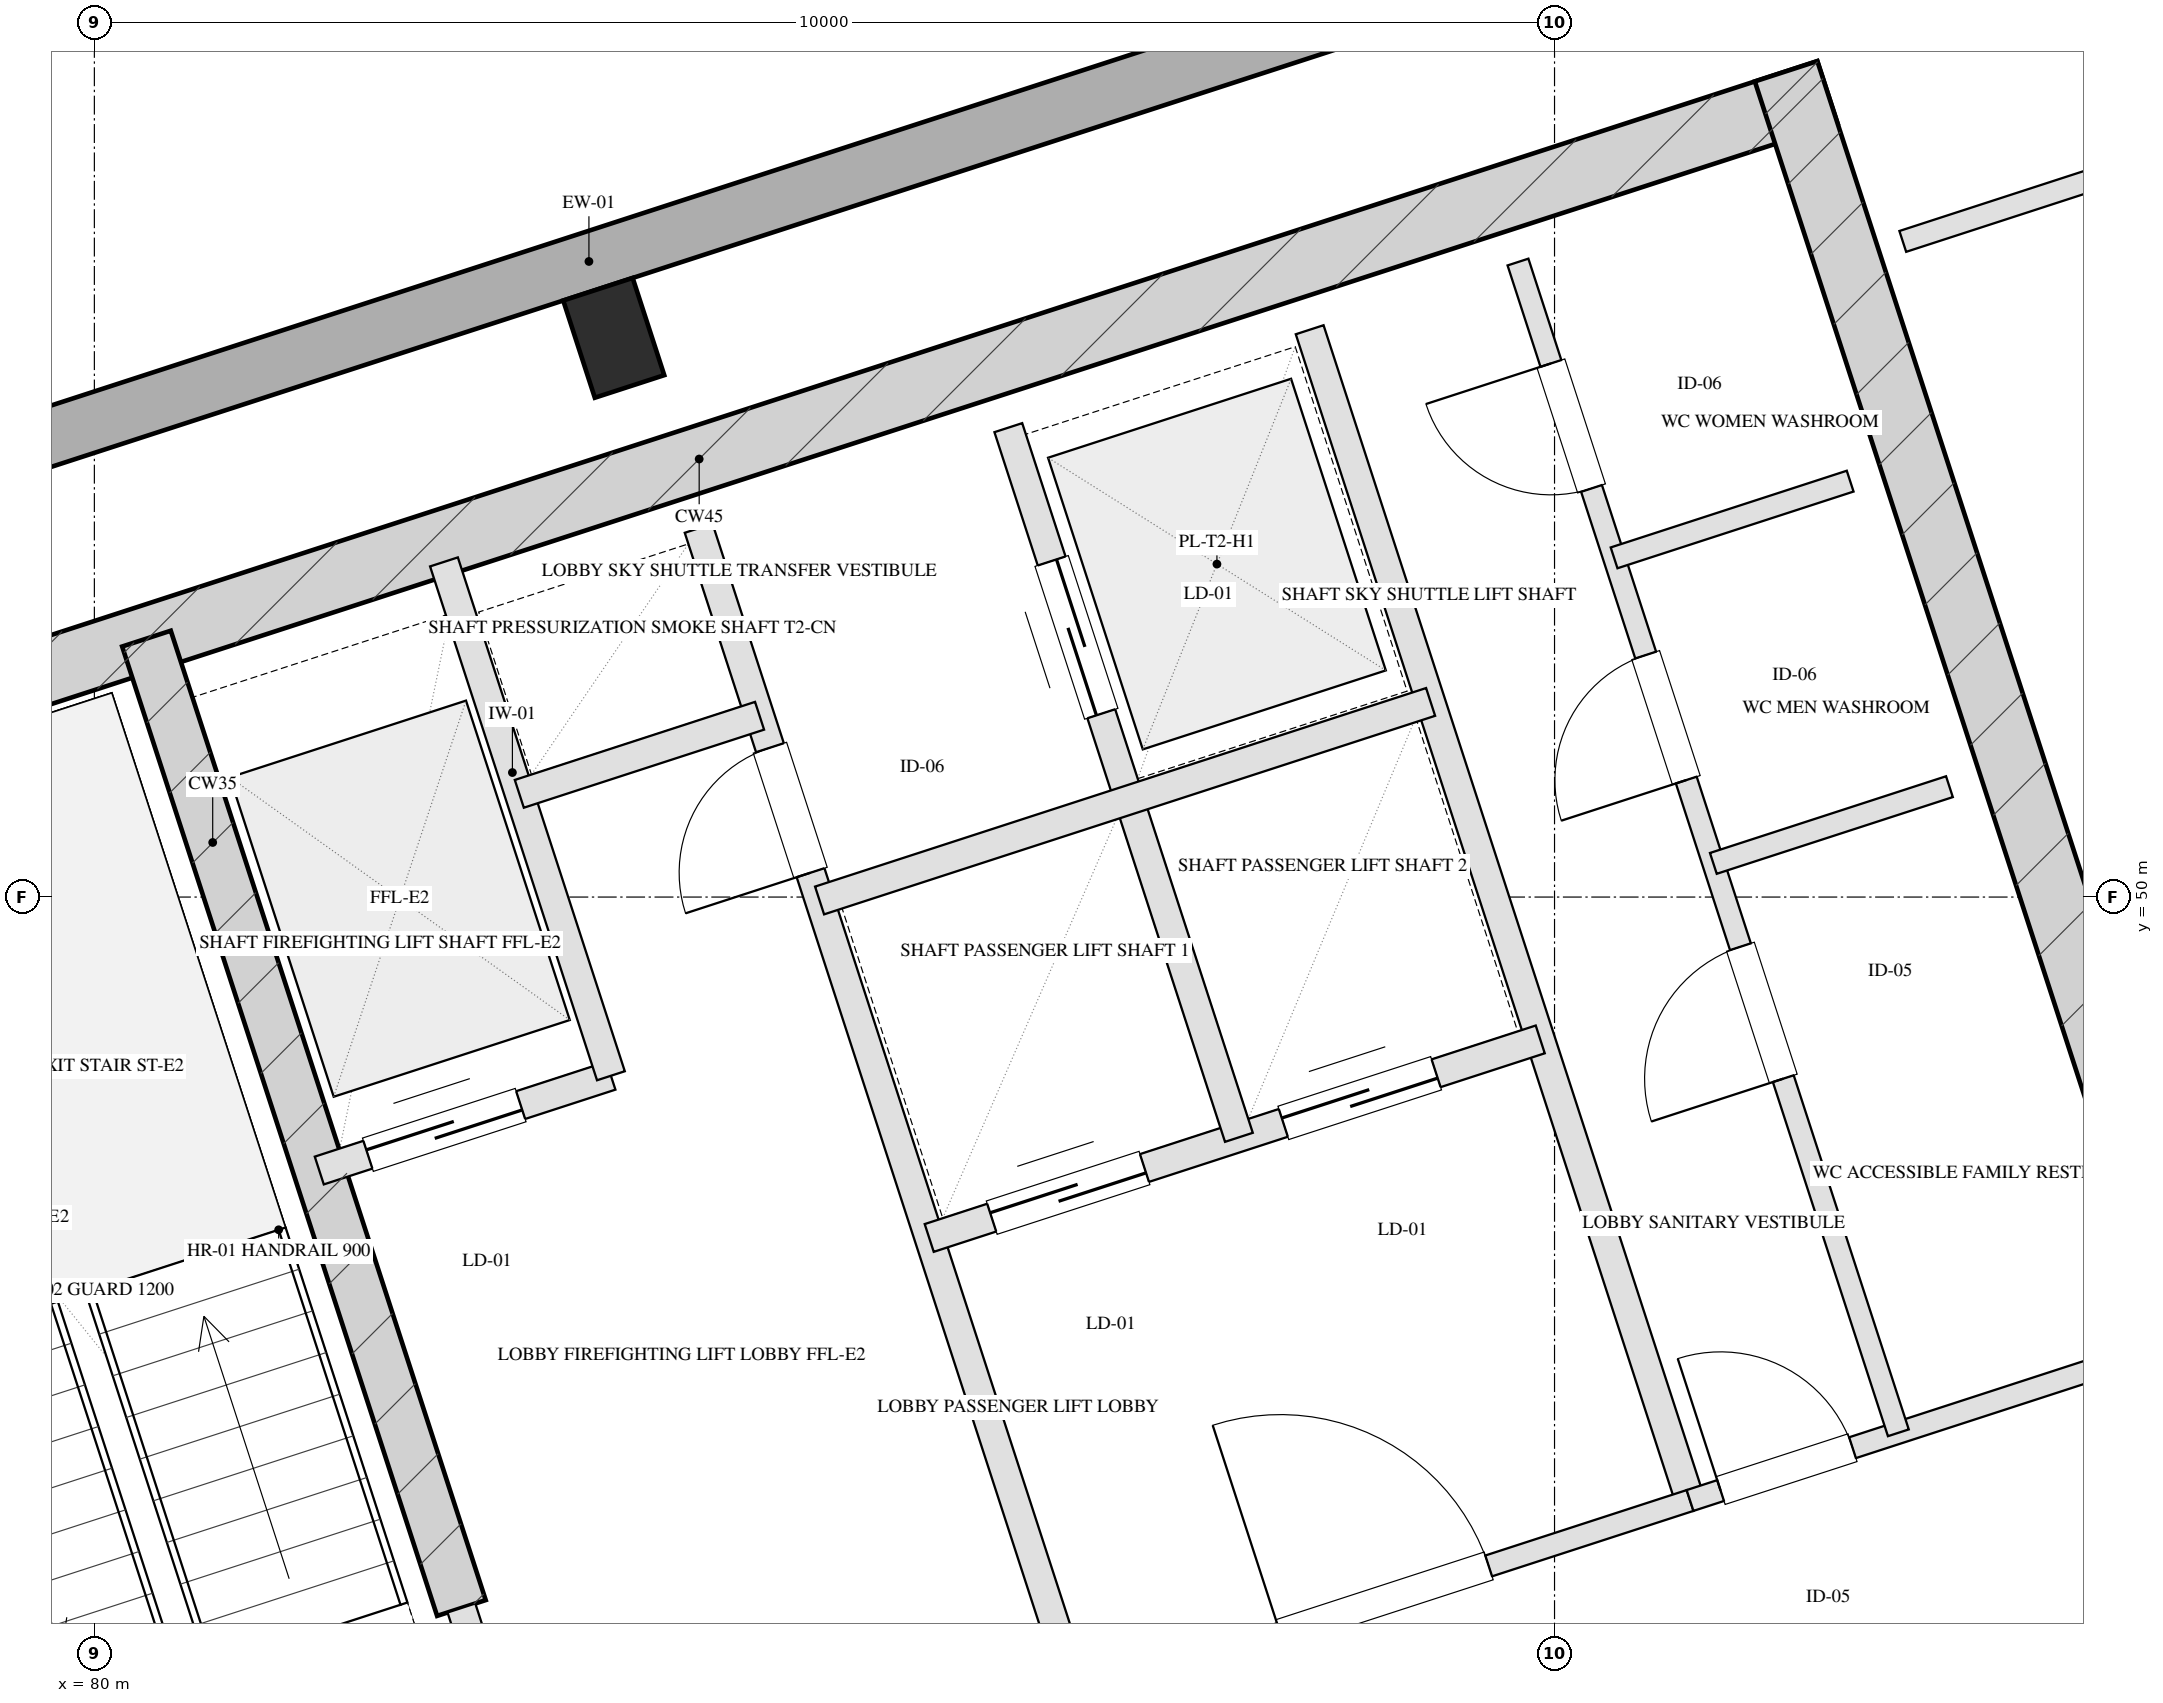
"""IFC4 building model, lengths in metres.
Left out: names, types, materials, properties, quantities, classifications, styles, units other than length and angle.
Written with IfcOpenShell. Run it as: python <this file> out.ifc"""

import sys

from ifc_helpers import new_model, si_unit, direction, frame, frame_2d, origin, origin_2d, place, context, subcontext, project, spatial, rectangle, hollow_rectangle, extrude, element, fill, save


model = new_model("IFC4")
c1 = context("Model", 3, precision=1e-05, world=origin(), true_north=direction((0.0, 1.0)))
c2 = subcontext(c1, "Body", "Model", "MODEL_VIEW")
j1 = project(units=[si_unit("LENGTHUNIT", "METRE"), si_unit("PLANEANGLEUNIT", "RADIAN")], contexts=[c1])
p1 = place(None, origin())
s1 = spatial("IfcSite", under=j1, at=p1, CompositionType="ELEMENT")
p2 = place(p1, origin())
s2 = spatial("IfcBuilding", under=s1, at=p2, CompositionType="ELEMENT")
p3 = place(p2, frame((0.0, 0.0, 216.2)))
s3 = spatial("IfcBuildingStorey", under=s2, at=p3, CompositionType="ELEMENT", Elevation=216.2)
p4 = place(p3, frame((76.415, 50.489, 0.0), z_axis=(0.0, 0.0, 1.0), x_axis=(0.951056810414, 0.309016089169, 0.0)))
e1 = element("IfcWall", 1, at=p4, inside=s3, PredefinedType="SHEAR", context=c2, shape_type="SweptSolid", body=[
    extrude(rectangle(XDim=16.25, YDim=0.45, at=frame_2d((8.125, 0.0))), origin(), (0.0, 0.0, 1.0), 3.45),
])
p5 = place(p3, frame((94.469, 46.781, 0.0), z_axis=(0.0, 0.0, 1.0), x_axis=(-0.309004419953, 0.951060601881, 0.0)))
e2 = element("IfcWall", 2, at=p5, inside=s3, PredefinedType="SHEAR", context=c2, shape_type="SweptSolid", body=[
    extrude(rectangle(XDim=9.33, YDim=0.45, at=frame_2d((4.665, 0.0))), origin(), (0.0, 0.0, 1.0), 3.45),
])
p6 = place(p3, frame((82.514, 45.131, 0.0), z_axis=(0.0, 0.0, 1.0), x_axis=(-0.308988790936, 0.951065679686, 0.0)))
e3 = element("IfcWall", 3, at=p6, inside=s3, PredefinedType="SHEAR", context=c2, shape_type="SweptSolid", body=[
    extrude(rectangle(XDim=6.98, YDim=0.35, at=frame_2d((3.49, 0.0))), origin(), (0.0, 0.0, 1.0), 3.45),
])
p7 = place(p3, frame((83.557, 53.83, 0.0), z_axis=(0.0, 0.0, 1.0), x_axis=(0.951056516295, 0.309016994375, 0.0)))
e4 = element("IfcColumn", 4, at=p7, inside=s3, PredefinedType="COLUMN", context=c2, shape_type="SweptSolid", body=[
    extrude(hollow_rectangle(XDim=0.5, YDim=0.7, WallThickness=0.025, at=origin_2d()), origin(), (0.0, 0.0, 1.0), 3.451),
])
p8 = place(p3, frame((82.618, 11.414, 0.0), z_axis=(0.0, 0.0, 1.0), x_axis=(-0.309016491071, 0.951056679828, 0.0)))
e5 = element("IfcWall", 5, at=p8, inside=s3, PredefinedType="SOLIDWALL", context=c2, shape_type="SweptSolid", body=[
    extrude(rectangle(XDim=38.4, YDim=0.4, at=frame_2d((19.2, 0.0))), origin(), (0.0, 0.0, 1.0), 2.55),
])
p9 = place(p8, frame((24.15, 0.0, 0.0)))
e6 = element("IfcOpeningElement", 6, at=p9, cuts=e5, PredefinedType="OPENING", context=c2, shape_type="SweptSolid", body=[
    extrude(rectangle(XDim=1.8, YDim=2.2, at=frame_2d((0.9, 1.1))), frame((0.0, 0.21, 0.0), z_axis=(0.0, -1.0, 0.0), x_axis=(1.0, 0.0, 0.0)), (0.0, 0.0, 1.0), 0.42),
])
p10 = place(p3, frame((72.165, 50.706, 0.0), z_axis=(0.0, 0.0, 1.0), x_axis=(0.951058012937, 0.309012388148, 0.0)))
e7 = element("IfcWall", 7, at=p10, inside=s3, PredefinedType="SOLIDWALL", context=c2, shape_type="SweptSolid", body=[
    extrude(rectangle(XDim=23.6, YDim=0.4, at=frame_2d((11.8, 0.0))), origin(), (0.0, 0.0, 1.0), 2.55),
])
p11 = place(p3, frame((83.101, 43.324, 0.0), z_axis=(0.0, 0.0, 1.0), x_axis=(-0.309048298632, 0.951046344356, 0.0)))
e8 = element("IfcWall", 8, at=p11, inside=s3, PredefinedType="PARTITIONING", context=c2, shape_type="SweptSolid", body=[
    extrude(rectangle(XDim=1.9, YDim=0.2, at=frame_2d((0.95, 0.0))), origin(), (0.0, 0.0, 1.0), 3.155),
])
p12 = place(p11, frame((0.52, 0.0, 0.0)))
e9 = element("IfcOpeningElement", 9, at=p12, cuts=e8, PredefinedType="OPENING", context=c2, shape_type="SweptSolid", body=[
    extrude(rectangle(XDim=1.1, YDim=2.05, at=frame_2d((0.55, 1.025))), frame((0.0, 0.11, 0.0), z_axis=(0.0, -1.0, 0.0), x_axis=(1.0, 0.0, 0.0)), (0.0, 0.0, 1.0), 0.22),
])
p13 = place(p3, frame((86.743, 44.508, 0.0), z_axis=(0.0, 0.0, 1.0), x_axis=(-0.309016001439, 0.951056838919, 0.0)))
e10 = element("IfcWall", 10, at=p13, inside=s3, PredefinedType="PARTITIONING", context=c2, shape_type="SweptSolid", body=[
    extrude(rectangle(XDim=8.43, YDim=0.2, at=frame_2d((4.215, 0.0))), origin(), (0.0, 0.0, 1.0), 3.155),
])
p14 = place(p13, frame((5.95, 0.0, 0.0)))
e11 = element("IfcOpeningElement", 11, at=p14, cuts=e10, PredefinedType="OPENING", context=c2, shape_type="SweptSolid", body=[
    extrude(rectangle(XDim=0.9, YDim=2.05, at=frame_2d((0.45, 1.025))), frame((0.0, 0.11, 0.0), z_axis=(0.0, -1.0, 0.0), x_axis=(1.0, 0.0, 0.0)), (0.0, 0.0, 1.0), 0.22),
])
p15 = place(p3, frame((81.54, 48.127, 0.0), z_axis=(0.0, 0.0, 1.0), x_axis=(0.951062257173, 0.308999325213, 0.0)))
e12 = element("IfcWall", 12, at=p15, inside=s3, PredefinedType="PARTITIONING", context=c2, shape_type="SweptSolid", body=[
    extrude(rectangle(XDim=2.1, YDim=0.2, at=frame_2d((1.05, 0.0))), origin(), (0.0, 0.0, 1.0), 3.155),
])
p16 = place(p15, frame((0.35, 0.0, 0.0)))
e13 = element("IfcOpeningElement", 13, at=p16, cuts=e12, PredefinedType="OPENING", context=c2, shape_type="SweptSolid", body=[
    extrude(rectangle(XDim=1.1, YDim=2.05, at=frame_2d((0.55, 1.025))), frame((0.0, 0.11, 0.0), z_axis=(0.0, -1.0, 0.0), x_axis=(1.0, 0.0, 0.0)), (0.0, 0.0, 1.0), 0.22),
])
p17 = place(p3, frame((83.538, 48.776, 0.0), z_axis=(0.0, 0.0, 1.0), x_axis=(-0.3089935693, 0.951064127245, 0.0)))
e14 = element("IfcWall", 14, at=p17, inside=s3, PredefinedType="PARTITIONING", context=c2, shape_type="SweptSolid", body=[
    extrude(rectangle(XDim=3.7, YDim=0.2, at=frame_2d((1.85, 0.0))), origin(), (0.0, 0.0, 1.0), 3.155),
])
p18 = place(p3, frame((82.91, 50.707, 0.0), z_axis=(0.0, 0.0, 1.0), x_axis=(0.951041328149, 0.309063734775, 0.0)))
e15 = element("IfcWall", 15, at=p18, inside=s3, PredefinedType="PARTITIONING", context=c2, shape_type="SweptSolid", body=[
    extrude(rectangle(XDim=1.73, YDim=0.2, at=frame_2d((0.865, 0.0))), origin(), (0.0, 0.0, 1.0), 3.155),
])
p19 = place(p3, frame((90.928, 45.868, 0.0), z_axis=(0.0, 0.0, 1.0), x_axis=(-0.309042196757, 0.951048327176, 0.0)))
e16 = element("IfcWall", 16, at=p19, inside=s3, PredefinedType="PARTITIONING", context=c2, shape_type="SweptSolid", body=[
    extrude(rectangle(XDim=8.43, YDim=0.2, at=frame_2d((4.215, 0.0))), origin(), (0.0, 0.0, 1.0), 3.155),
])
p20 = place(p3, frame((86.743, 44.508, 0.0), z_axis=(0.0, 0.0, 1.0), x_axis=(0.951063829732, 0.308994485023, 0.0)))
e17 = element("IfcWall", 17, at=p20, inside=s3, PredefinedType="PARTITIONING", context=c2, shape_type="SweptSolid", body=[
    extrude(rectangle(XDim=4.4, YDim=0.15, at=frame_2d((2.2, 0.0))), origin(), (0.0, 0.0, 1.0), 3.155),
])
p21 = place(p20, frame((1.45, 0.0, 0.0)))
e18 = element("IfcOpeningElement", 18, at=p21, cuts=e17, PredefinedType="OPENING", context=c2, shape_type="SweptSolid", body=[
    extrude(rectangle(XDim=1.5, YDim=2.05, at=frame_2d((0.75, 1.025))), frame((0.0, 0.085, 0.0), z_axis=(0.0, -1.0, 0.0), x_axis=(1.0, 0.0, 0.0)), (0.0, 0.0, 1.0), 0.17),
])
p22 = place(p3, frame((85.718, 47.666, 0.0), z_axis=(0.0, 0.0, 1.0), x_axis=(0.951058531764, 0.30901079133, 0.0)))
e19 = element("IfcWall", 19, at=p22, inside=s3, PredefinedType="PARTITIONING", context=c2, shape_type="SweptSolid", body=[
    extrude(rectangle(XDim=4.4, YDim=0.2, at=frame_2d((2.2, 0.0))), origin(), (0.0, 0.0, 1.0), 3.155),
])
p23 = place(p22, frame((0.45, 0.0, 0.0)))
e20 = element("IfcOpeningElement", 20, at=p23, cuts=e19, PredefinedType="OPENING", context=c2, shape_type="SweptSolid", body=[
    extrude(rectangle(XDim=1.1, YDim=2.05, at=frame_2d((0.55, 1.025))), frame((0.0, 0.11, 0.0), z_axis=(0.0, -1.0, 0.0), x_axis=(1.0, 0.0, 0.0)), (0.0, 0.0, 1.0), 0.22),
])
p24 = place(p22, frame((2.55, 0.0, 0.0)))
e21 = element("IfcOpeningElement", 21, at=p24, cuts=e19, PredefinedType="OPENING", context=c2, shape_type="SweptSolid", body=[
    extrude(rectangle(XDim=1.1, YDim=2.05, at=frame_2d((0.55, 1.025))), frame((0.0, 0.11, 0.0), z_axis=(0.0, -1.0, 0.0), x_axis=(1.0, 0.0, 0.0)), (0.0, 0.0, 1.0), 0.22),
])
p25 = place(p3, frame((87.838, 48.354, 0.0), z_axis=(0.0, 0.0, 1.0), x_axis=(-0.3090093719, 0.951058992953, 0.0)))
e22 = element("IfcWall", 22, at=p25, inside=s3, PredefinedType="PARTITIONING", context=c2, shape_type="SweptSolid", body=[
    extrude(rectangle(XDim=5.11, YDim=0.2, at=frame_2d((2.555, 0.0))), origin(), (0.0, 0.0, 1.0), 3.155),
])
p26 = place(p25, frame((3.05, 0.0, 0.0)))
e23 = element("IfcOpeningElement", 23, at=p26, cuts=e22, PredefinedType="OPENING", context=c2, shape_type="SweptSolid", body=[
    extrude(rectangle(XDim=1.1, YDim=2.05, at=frame_2d((0.55, 1.025))), frame((0.0, 0.11, 0.0), z_axis=(0.0, -1.0, 0.0), x_axis=(1.0, 0.0, 0.0)), (0.0, 0.0, 1.0), 0.22),
])
p27 = place(p3, frame((84.967, 49.977, 0.0), z_axis=(0.0, 0.0, 1.0), x_axis=(0.951063829732, 0.308994485023, 0.0)))
e24 = element("IfcWall", 24, at=p27, inside=s3, PredefinedType="PARTITIONING", context=c2, shape_type="SweptSolid", body=[
    extrude(rectangle(XDim=4.4, YDim=0.2, at=frame_2d((2.2, 0.0))), origin(), (0.0, 0.0, 1.0), 3.155),
])
p28 = place(p3, frame((90.928, 45.868, 0.0), z_axis=(0.0, 0.0, 1.0), x_axis=(0.951059297078, 0.309008435874, 0.0)))
e25 = element("IfcWall", 25, at=p28, inside=s3, PredefinedType="PARTITIONING", context=c2, shape_type="SweptSolid", body=[
    extrude(rectangle(XDim=3.2, YDim=0.15, at=frame_2d((1.6, 0.0))), origin(), (0.0, 0.0, 1.0), 3.155),
])
p29 = place(p28, frame((0.22, 0.0, 0.0)))
e26 = element("IfcOpeningElement", 26, at=p29, cuts=e25, PredefinedType="OPENING", context=c2, shape_type="SweptSolid", body=[
    extrude(rectangle(XDim=0.95, YDim=2.05, at=frame_2d((0.475, 1.025))), frame((0.0, 0.085, 0.0), z_axis=(0.0, -1.0, 0.0), x_axis=(1.0, 0.0, 0.0)), (0.0, 0.0, 1.0), 0.17),
])
p30 = place(p3, frame((92.355, 46.331, 0.0), z_axis=(0.0, 0.0, 1.0), x_axis=(-0.309007490203, 0.951059604335, 0.0)))
e27 = element("IfcWall", 27, at=p30, inside=s3, PredefinedType="PARTITIONING", context=c2, shape_type="SweptSolid", body=[
    extrude(rectangle(XDim=8.43, YDim=0.15, at=frame_2d((4.215, 0.0))), origin(), (0.0, 0.0, 1.0), 3.155),
])
p31 = place(p30, frame((2.55, 0.0, 0.0)))
e28 = element("IfcOpeningElement", 28, at=p31, cuts=e27, PredefinedType="OPENING", context=c2, shape_type="SweptSolid", body=[
    extrude(rectangle(XDim=0.95, YDim=2.05, at=frame_2d((0.475, 1.025))), frame((0.0, 0.085, 0.0), z_axis=(0.0, -1.0, 0.0), x_axis=(1.0, 0.0, 0.0)), (0.0, 0.0, 1.0), 0.17),
])
p32 = place(p30, frame((4.7, 0.0, 0.0)))
e29 = element("IfcOpeningElement", 29, at=p32, cuts=e27, PredefinedType="OPENING", context=c2, shape_type="SweptSolid", body=[
    extrude(rectangle(XDim=0.9, YDim=2.05, at=frame_2d((0.45, 1.025))), frame((0.0, 0.085, 0.0), z_axis=(0.0, -1.0, 0.0), x_axis=(1.0, 0.0, 0.0)), (0.0, 0.0, 1.0), 0.17),
])
p33 = place(p30, frame((6.8, 0.0, 0.0)))
e30 = element("IfcOpeningElement", 30, at=p33, cuts=e27, PredefinedType="OPENING", context=c2, shape_type="SweptSolid", body=[
    extrude(rectangle(XDim=0.9, YDim=2.05, at=frame_2d((0.45, 1.025))), frame((0.0, 0.085, 0.0), z_axis=(0.0, -1.0, 0.0), x_axis=(1.0, 0.0, 0.0)), (0.0, 0.0, 1.0), 0.17),
])
p34 = place(p3, frame((91.088, 50.23, 0.0), z_axis=(0.0, 0.0, 1.0), x_axis=(0.951054116971, 0.309024378638, 0.0)))
e31 = element("IfcWall", 31, at=p34, inside=s3, PredefinedType="PARTITIONING", context=c2, shape_type="SweptSolid", body=[
    extrude(rectangle(XDim=1.7, YDim=0.15, at=frame_2d((0.85, 0.0))), origin(), (0.0, 0.0, 1.0), 3.155),
])
p35 = place(p3, frame((90.408, 52.323, 0.0), z_axis=(0.0, 0.0, 1.0), x_axis=(0.951040401051, 0.309066587596, 0.0)))
e32 = element("IfcWall", 32, at=p35, inside=s3, PredefinedType="PARTITIONING", context=c2, shape_type="SweptSolid", body=[
    extrude(rectangle(XDim=1.7, YDim=0.15, at=frame_2d((0.85, 0.0))), origin(), (0.0, 0.0, 1.0), 3.155),
])
p36 = place(p3, frame((92.385, 54.49, 0.0), z_axis=(0.0, 0.0, 1.0), x_axis=(0.951055112834, 0.309021313752, 0.0)))
e33 = element("IfcWall", 33, at=p36, inside=s3, PredefinedType="PARTITIONING", context=c2, shape_type="SweptSolid", body=[
    extrude(rectangle(XDim=5.2, YDim=0.15, at=frame_2d((2.6, 0.0))), origin(), (0.0, 0.0, 1.0), 3.155),
])
p37 = place(p14, origin())
e34 = element("IfcDoor", 34, at=p37, inside=s3, OperationType="SINGLE_SWING_LEFT", PredefinedType="DOOR", context=c2, shape_type="SweptSolid", body=[
    extrude(rectangle(XDim=0.9, YDim=2.05, at=frame_2d((0.45, 1.025))), frame((0.0, 0.025, 0.0), z_axis=(0.0, -1.0, 0.0), x_axis=(1.0, 0.0, 0.0)), (0.0, 0.0, 1.0), 0.05),
])
fill(e11, e34)
p38 = place(p16, origin())
e35 = element("IfcDoor", 35, at=p38, inside=s3, OperationType="DOUBLE_DOOR_SLIDING", PredefinedType="DOOR", context=c2, shape_type="SweptSolid", body=[
    extrude(rectangle(XDim=1.1, YDim=2.05, at=frame_2d((0.55, 1.025))), frame((0.0, 0.025, 0.0), z_axis=(0.0, -1.0, 0.0), x_axis=(1.0, 0.0, 0.0)), (0.0, 0.0, 1.0), 0.05),
])
fill(e13, e35)
p39 = place(p21, origin())
e36 = element("IfcDoor", 36, at=p39, inside=s3, OperationType="SINGLE_SWING_LEFT", PredefinedType="DOOR", context=c2, shape_type="SweptSolid", body=[
    extrude(rectangle(XDim=1.5, YDim=2.05, at=frame_2d((0.75, 1.025))), frame((0.0, 0.025, 0.0), z_axis=(0.0, -1.0, 0.0), x_axis=(1.0, 0.0, 0.0)), (0.0, 0.0, 1.0), 0.05),
])
fill(e18, e36)
p40 = place(p23, origin())
e37 = element("IfcDoor", 37, at=p40, inside=s3, OperationType="DOUBLE_DOOR_SLIDING", PredefinedType="DOOR", context=c2, shape_type="SweptSolid", body=[
    extrude(rectangle(XDim=1.1, YDim=2.05, at=frame_2d((0.55, 1.025))), frame((0.0, 0.025, 0.0), z_axis=(0.0, -1.0, 0.0), x_axis=(1.0, 0.0, 0.0)), (0.0, 0.0, 1.0), 0.05),
])
fill(e20, e37)
p41 = place(p24, origin())
e38 = element("IfcDoor", 38, at=p41, inside=s3, OperationType="DOUBLE_DOOR_SLIDING", PredefinedType="DOOR", context=c2, shape_type="SweptSolid", body=[
    extrude(rectangle(XDim=1.1, YDim=2.05, at=frame_2d((0.55, 1.025))), frame((0.0, 0.025, 0.0), z_axis=(0.0, -1.0, 0.0), x_axis=(1.0, 0.0, 0.0)), (0.0, 0.0, 1.0), 0.05),
])
fill(e21, e38)
p42 = place(p26, origin())
e39 = element("IfcDoor", 39, at=p42, inside=s3, OperationType="DOUBLE_DOOR_SLIDING", PredefinedType="DOOR", context=c2, shape_type="SweptSolid", body=[
    extrude(rectangle(XDim=1.1, YDim=2.05, at=frame_2d((0.55, 1.025))), frame((0.0, 0.025, 0.0), z_axis=(0.0, -1.0, 0.0), x_axis=(1.0, 0.0, 0.0)), (0.0, 0.0, 1.0), 0.05),
])
fill(e23, e39)
p43 = place(p29, origin())
e40 = element("IfcDoor", 40, at=p43, inside=s3, OperationType="SINGLE_SWING_LEFT", PredefinedType="DOOR", context=c2, shape_type="SweptSolid", body=[
    extrude(rectangle(XDim=0.95, YDim=2.05, at=frame_2d((0.475, 1.025))), frame((0.0, 0.025, 0.0), z_axis=(0.0, -1.0, 0.0), x_axis=(1.0, 0.0, 0.0)), (0.0, 0.0, 1.0), 0.05),
])
fill(e26, e40)
p44 = place(p31, origin())
e41 = element("IfcDoor", 41, at=p44, inside=s3, OperationType="SINGLE_SWING_LEFT", PredefinedType="DOOR", context=c2, shape_type="SweptSolid", body=[
    extrude(rectangle(XDim=0.95, YDim=2.05, at=frame_2d((0.475, 1.025))), frame((0.0, 0.025, 0.0), z_axis=(0.0, -1.0, 0.0), x_axis=(1.0, 0.0, 0.0)), (0.0, 0.0, 1.0), 0.05),
])
fill(e28, e41)
p45 = place(p32, origin())
e42 = element("IfcDoor", 42, at=p45, inside=s3, OperationType="SINGLE_SWING_LEFT", PredefinedType="DOOR", context=c2, shape_type="SweptSolid", body=[
    extrude(rectangle(XDim=0.9, YDim=2.05, at=frame_2d((0.45, 1.025))), frame((0.0, 0.025, 0.0), z_axis=(0.0, -1.0, 0.0), x_axis=(1.0, 0.0, 0.0)), (0.0, 0.0, 1.0), 0.05),
])
fill(e29, e42)
p46 = place(p33, origin())
e43 = element("IfcDoor", 43, at=p46, inside=s3, OperationType="SINGLE_SWING_RIGHT", PredefinedType="DOOR", context=c2, shape_type="SweptSolid", body=[
    extrude(rectangle(XDim=0.9, YDim=2.05, at=frame_2d((0.45, 1.025))), frame((0.0, 0.025, 0.0), z_axis=(0.0, -1.0, 0.0), x_axis=(1.0, 0.0, 0.0)), (0.0, 0.0, 1.0), 0.05),
])
fill(e30, e43)
save(model, sys.argv[1])
